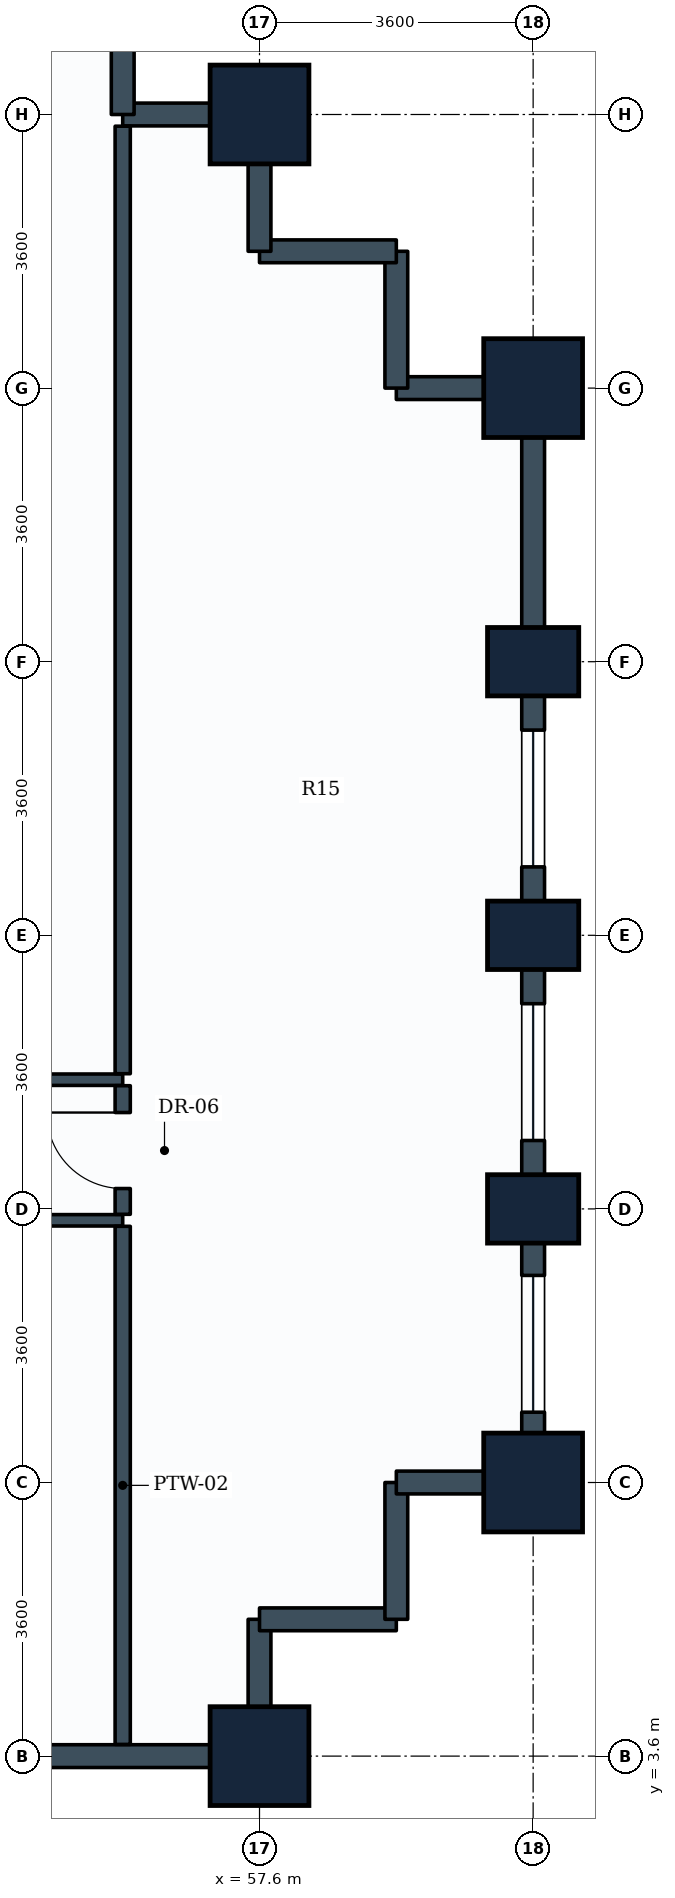
"""IFC4 building model, lengths in metres.
Left out: names, types, materials, properties, quantities, classifications, styles, units other than length and angle.
Written with IfcOpenShell. Run it as: python <this file> out.ifc"""

import sys

from ifc_helpers import new_model, si_unit, direction, frame, frame_2d, origin, origin_2d, place, context, subcontext, project, spatial, rectangle, extrude, element, fill, save


model = new_model("IFC4")
c1 = context("Model", 3, precision=1e-05, world=origin(), true_north=direction((0.0, 1.0)))
c2 = subcontext(c1, "Body", "Model", "MODEL_VIEW")
j1 = project(units=[si_unit("LENGTHUNIT", "METRE"), si_unit("PLANEANGLEUNIT", "RADIAN")], contexts=[c1])
p1 = place(None, origin())
s1 = spatial("IfcSite", under=j1, at=p1, CompositionType="ELEMENT")
p2 = place(p1, origin())
s2 = spatial("IfcBuilding", under=s1, at=p2, CompositionType="ELEMENT")
p3 = place(p2, frame((0.0, 0.0, 70.8)))
s3 = spatial("IfcBuildingStorey", under=s2, at=p3, CompositionType="ELEMENT", Elevation=70.8)
for number, where, z_axis, x_axis in (
    (1, (57.6, 3.6, 0.0), (0.0, 0.0, 1.0), (1.0, 0.0, 0.0)),
    (2, (57.6, 25.2, 0.0), (0.0, 0.0, 1.0), (1.0, 0.0, 0.0)),
    (3, (61.2, 7.2, 0.0), (0.0, 0.0, 1.0), (1.0, 0.0, 0.0)),
):
    element("IfcColumn", number, at=place(p3, frame(where, z_axis=z_axis, x_axis=x_axis)), inside=s3, PredefinedType="COLUMN", context=c2, shape_type="SweptSolid", body=[
        extrude(rectangle(XDim=1.3, YDim=1.3, at=origin_2d()), origin(), (0.0, 0.0, 1.0), 3.9),
    ])
for number, where, z_axis, x_axis in (
    (4, (61.2, 10.8, 0.0), (0.0, 0.0, 1.0), (0.0, 1.0, 0.0)),
    (5, (61.2, 14.4, 0.0), (0.0, 0.0, 1.0), (0.0, 1.0, 0.0)),
    (6, (61.2, 18.0, 0.0), (0.0, 0.0, 1.0), (0.0, 1.0, 0.0)),
):
    element("IfcColumn", number, at=place(p3, frame(where, z_axis=z_axis, x_axis=x_axis)), inside=s3, PredefinedType="COLUMN", context=c2, shape_type="SweptSolid", body=[
        extrude(rectangle(XDim=0.9, YDim=1.2, at=origin_2d()), origin(), (0.0, 0.0, 1.0), 3.9),
    ])
p4 = place(p3, frame((61.2, 21.6, 0.0), z_axis=(0.0, 0.0, 1.0), x_axis=(0.0, 1.0, 0.0)))
e7 = element("IfcColumn", 7, at=p4, inside=s3, PredefinedType="COLUMN", context=c2, shape_type="SweptSolid", body=[
    extrude(rectangle(XDim=1.3, YDim=1.3, at=origin_2d()), origin(), (0.0, 0.0, 1.0), 3.9),
])
p5 = place(p3, frame((57.6, 3.6, 0.0), z_axis=(0.0, 0.0, 1.0), x_axis=(-1.0, 0.0, 0.0)))
e8 = element("IfcWall", 8, at=p5, inside=s3, PredefinedType="STANDARD", context=c2, shape_type="SweptSolid", body=[
    extrude(rectangle(XDim=3.6, YDim=0.3, at=frame_2d((1.8, 0.0))), origin(), (0.0, 0.0, 1.0), 2.93),
])
p6 = place(p3, frame((57.6, 5.4, 0.0), z_axis=(0.0, 0.0, 1.0), x_axis=(0.0, -1.0, 0.0)))
e9 = element("IfcWall", 9, at=p6, inside=s3, PredefinedType="STANDARD", context=c2, shape_type="SweptSolid", body=[
    extrude(rectangle(XDim=1.8, YDim=0.3, at=frame_2d((0.9, 0.0))), origin(), (0.0, 0.0, 1.0), 2.93),
])
p7 = place(p3, frame((59.4, 5.4, 0.0), z_axis=(0.0, 0.0, 1.0), x_axis=(-1.0, 0.0, 0.0)))
e10 = element("IfcWall", 10, at=p7, inside=s3, PredefinedType="STANDARD", context=c2, shape_type="SweptSolid", body=[
    extrude(rectangle(XDim=1.8, YDim=0.3, at=frame_2d((0.9, 0.0))), origin(), (0.0, 0.0, 1.0), 3.565),
])
p8 = place(p3, frame((59.4, 7.2, 0.0), z_axis=(0.0, 0.0, 1.0), x_axis=(0.0, -1.0, 0.0)))
e11 = element("IfcWall", 11, at=p8, inside=s3, PredefinedType="STANDARD", context=c2, shape_type="SweptSolid", body=[
    extrude(rectangle(XDim=1.8, YDim=0.3, at=frame_2d((0.9, 0.0))), origin(), (0.0, 0.0, 1.0), 3.565),
])
p9 = place(p3, frame((61.2, 7.2, 0.0), z_axis=(0.0, 0.0, 1.0), x_axis=(-1.0, 0.0, 0.0)))
e12 = element("IfcWall", 12, at=p9, inside=s3, PredefinedType="STANDARD", context=c2, shape_type="SweptSolid", body=[
    extrude(rectangle(XDim=1.8, YDim=0.3, at=frame_2d((0.9, 0.0))), origin(), (0.0, 0.0, 1.0), 2.93),
])
p10 = place(p3, frame((61.2, 10.8, 0.0), z_axis=(0.0, 0.0, 1.0), x_axis=(0.0, -1.0, 0.0)))
e13 = element("IfcWall", 13, at=p10, inside=s3, PredefinedType="STANDARD", context=c2, shape_type="SweptSolid", body=[
    extrude(rectangle(XDim=3.6, YDim=0.3, at=frame_2d((1.8, 0.0))), origin(), (0.0, 0.0, 1.0), 2.93),
])
p11 = place(p10, frame((0.875, 0.0, 0.85)))
e14 = element("IfcOpeningElement", 14, at=p11, cuts=e13, PredefinedType="OPENING", context=c2, shape_type="SweptSolid", body=[
    extrude(rectangle(XDim=1.8, YDim=1.35, at=frame_2d((0.9, 0.675))), frame((0.0, 0.16, 0.0), z_axis=(0.0, -1.0, 0.0), x_axis=(1.0, 0.0, 0.0)), (0.0, 0.0, 1.0), 0.32),
])
p12 = place(p3, frame((61.2, 14.4, 0.0), z_axis=(0.0, 0.0, 1.0), x_axis=(0.0, -1.0, 0.0)))
e15 = element("IfcWall", 15, at=p12, inside=s3, PredefinedType="STANDARD", context=c2, shape_type="SweptSolid", body=[
    extrude(rectangle(XDim=3.6, YDim=0.3, at=frame_2d((1.8, 0.0))), origin(), (0.0, 0.0, 1.0), 2.93),
])
p13 = place(p12, frame((0.9, 0.0, 0.85)))
e16 = element("IfcOpeningElement", 16, at=p13, cuts=e15, PredefinedType="OPENING", context=c2, shape_type="SweptSolid", body=[
    extrude(rectangle(XDim=1.8, YDim=1.35, at=frame_2d((0.9, 0.675))), frame((0.0, 0.16, 0.0), z_axis=(0.0, -1.0, 0.0), x_axis=(1.0, 0.0, 0.0)), (0.0, 0.0, 1.0), 0.32),
])
p14 = place(p3, frame((61.2, 18.0, 0.0), z_axis=(0.0, 0.0, 1.0), x_axis=(0.0, -1.0, 0.0)))
e17 = element("IfcWall", 17, at=p14, inside=s3, PredefinedType="STANDARD", context=c2, shape_type="SweptSolid", body=[
    extrude(rectangle(XDim=3.6, YDim=0.3, at=frame_2d((1.8, 0.0))), origin(), (0.0, 0.0, 1.0), 2.93),
])
p15 = place(p14, frame((0.9, 0.0, 0.85)))
e18 = element("IfcOpeningElement", 18, at=p15, cuts=e17, PredefinedType="OPENING", context=c2, shape_type="SweptSolid", body=[
    extrude(rectangle(XDim=1.8, YDim=1.35, at=frame_2d((0.9, 0.675))), frame((0.0, 0.16, 0.0), z_axis=(0.0, -1.0, 0.0), x_axis=(1.0, 0.0, 0.0)), (0.0, 0.0, 1.0), 0.32),
])
p16 = place(p3, frame((61.2, 21.6, 0.0), z_axis=(0.0, 0.0, 1.0), x_axis=(0.0, -1.0, 0.0)))
e19 = element("IfcWall", 19, at=p16, inside=s3, PredefinedType="STANDARD", context=c2, shape_type="SweptSolid", body=[
    extrude(rectangle(XDim=3.6, YDim=0.3, at=frame_2d((1.8, 0.0))), origin(), (0.0, 0.0, 1.0), 2.93),
])
p17 = place(p3, frame((61.2, 21.6, 0.0), z_axis=(0.0, 0.0, 1.0), x_axis=(-1.0, 0.0, 0.0)))
e20 = element("IfcWall", 20, at=p17, inside=s3, PredefinedType="STANDARD", context=c2, shape_type="SweptSolid", body=[
    extrude(rectangle(XDim=1.8, YDim=0.3, at=frame_2d((0.9, 0.0))), origin(), (0.0, 0.0, 1.0), 2.93),
])
for number, where, z_axis, x_axis in (
    (21, (59.4, 23.4, 0.0), (0.0, 0.0, 1.0), (0.0, -1.0, 0.0)),
    (22, (57.6, 23.4, 0.0), (0.0, 0.0, 1.0), (1.0, 0.0, 0.0)),
):
    element("IfcWall", number, at=place(p3, frame(where, z_axis=z_axis, x_axis=x_axis)), inside=s3, PredefinedType="STANDARD", context=c2, shape_type="SweptSolid", body=[
        extrude(rectangle(XDim=1.8, YDim=0.3, at=frame_2d((0.9, 0.0))), origin(), (0.0, 0.0, 1.0), 3.565),
    ])
for number, where, z_axis, x_axis in (
    (23, (57.6, 25.2, 0.0), (0.0, 0.0, 1.0), (0.0, -1.0, 0.0)),
    (24, (55.8, 25.2, 0.0), (0.0, 0.0, 1.0), (1.0, 0.0, 0.0)),
):
    element("IfcWall", number, at=place(p3, frame(where, z_axis=z_axis, x_axis=x_axis)), inside=s3, PredefinedType="STANDARD", context=c2, shape_type="SweptSolid", body=[
        extrude(rectangle(XDim=1.8, YDim=0.3, at=frame_2d((0.9, 0.0))), origin(), (0.0, 0.0, 1.0), 2.93),
    ])
p18 = place(p3, frame((55.8, 27.3, 0.0), z_axis=(0.0, 0.0, 1.0), x_axis=(0.0, -1.0, 0.0)))
e25 = element("IfcWall", 25, at=p18, inside=s3, PredefinedType="STANDARD", context=c2, shape_type="SweptSolid", body=[
    extrude(rectangle(XDim=2.1, YDim=0.3, at=frame_2d((1.05, 0.0))), origin(), (0.0, 0.0, 1.0), 2.93),
])
p19 = place(p3, frame((45.609, 10.65, 0.0), z_axis=(0.0, 0.0, 1.0), x_axis=(1.0, 0.0, 0.0)))
e26 = element("IfcWall", 26, at=p19, inside=s3, PredefinedType="PARTITIONING", context=c2, shape_type="SweptSolid", body=[
    extrude(rectangle(XDim=10.191, YDim=0.15, at=frame_2d((5.096, 0.0))), origin(), (0.0, 0.0, 1.0), 2.96),
])
p20 = place(p19, frame((4.516, 0.0, 0.0)))
e27 = element("IfcOpeningElement", 27, at=p20, cuts=e26, PredefinedType="OPENING", context=c2, shape_type="SweptSolid", body=[
    extrude(rectangle(XDim=1.0, YDim=2.1, at=frame_2d((0.5, 1.05))), frame((0.0, 0.085, 0.0), z_axis=(0.0, -1.0, 0.0), x_axis=(1.0, 0.0, 0.0)), (0.0, 0.0, 1.0), 0.17),
])
p21 = place(p3, frame((45.129, 12.5, 0.0), z_axis=(0.0, 0.0, 1.0), x_axis=(1.0, 0.0, 0.0)))
e28 = element("IfcWall", 28, at=p21, inside=s3, PredefinedType="PARTITIONING", context=c2, shape_type="SweptSolid", body=[
    extrude(rectangle(XDim=10.671, YDim=0.15, at=frame_2d((5.335, 0.0))), origin(), (0.0, 0.0, 1.0), 2.97),
])
p22 = place(p21, frame((1.719, 0.0, 0.0)))
e29 = element("IfcOpeningElement", 29, at=p22, cuts=e28, PredefinedType="OPENING", context=c2, shape_type="SweptSolid", body=[
    extrude(rectangle(XDim=1.0, YDim=2.1, at=frame_2d((0.5, 1.05))), frame((0.0, 0.085, 0.0), z_axis=(0.0, -1.0, 0.0), x_axis=(1.0, 0.0, 0.0)), (0.0, 0.0, 1.0), 0.17),
])
p23 = place(p3, frame((55.8, 3.754, 0.0), z_axis=(0.0, 0.0, 1.0), x_axis=(0.0, 1.0, 0.0)))
e30 = element("IfcWall", 30, at=p23, inside=s3, PredefinedType="PARTITIONING", context=c2, shape_type="SweptSolid", body=[
    extrude(rectangle(XDim=6.817, YDim=0.2, at=frame_2d((3.409, 0.0))), origin(), (0.0, 0.0, 1.0), 2.93),
])
p24 = place(p3, frame((55.8, 12.579, 0.0), z_axis=(0.0, 0.0, 1.0), x_axis=(0.0, 1.0, 0.0)))
e31 = element("IfcWall", 31, at=p24, inside=s3, PredefinedType="PARTITIONING", context=c2, shape_type="SweptSolid", body=[
    extrude(rectangle(XDim=12.467, YDim=0.2, at=frame_2d((6.233, 0.0))), origin(), (0.0, 0.0, 1.0), 2.93),
])
p25 = place(p3, frame((55.8, 10.729, 0.0), z_axis=(0.0, 0.0, 1.0), x_axis=(0.0, 1.0, 0.0)))
e32 = element("IfcWall", 32, at=p25, inside=s3, PredefinedType="PARTITIONING", context=c2, shape_type="SweptSolid", body=[
    extrude(rectangle(XDim=1.692, YDim=0.2, at=frame_2d((0.846, 0.0))), origin(), (0.0, 0.0, 1.0), 3.565),
])
p26 = place(p25, frame((0.339, 0.0, 0.0)))
e33 = element("IfcOpeningElement", 33, at=p26, cuts=e32, PredefinedType="OPENING", context=c2, shape_type="SweptSolid", body=[
    extrude(rectangle(XDim=1.0, YDim=2.1, at=frame_2d((0.5, 1.05))), frame((0.0, 0.11, 0.0), z_axis=(0.0, -1.0, 0.0), x_axis=(1.0, 0.0, 0.0)), (0.0, 0.0, 1.0), 0.22),
])
p27 = place(p11, origin())
e34 = element("IfcWindow", 34, at=p27, inside=s3, PartitioningType="SINGLE_PANEL", PredefinedType="WINDOW", context=c2, shape_type="SweptSolid", body=[
    extrude(rectangle(XDim=1.8, YDim=1.35, at=frame_2d((0.9, 0.675))), frame((0.0, 0.03, 0.0), z_axis=(0.0, -1.0, 0.0), x_axis=(1.0, 0.0, 0.0)), (0.0, 0.0, 1.0), 0.06),
])
fill(e14, e34)
p28 = place(p13, origin())
e35 = element("IfcWindow", 35, at=p28, inside=s3, PartitioningType="SINGLE_PANEL", PredefinedType="WINDOW", context=c2, shape_type="SweptSolid", body=[
    extrude(rectangle(XDim=1.8, YDim=1.35, at=frame_2d((0.9, 0.675))), frame((0.0, 0.03, 0.0), z_axis=(0.0, -1.0, 0.0), x_axis=(1.0, 0.0, 0.0)), (0.0, 0.0, 1.0), 0.06),
])
fill(e16, e35)
p29 = place(p15, origin())
e36 = element("IfcWindow", 36, at=p29, inside=s3, PartitioningType="SINGLE_PANEL", PredefinedType="WINDOW", context=c2, shape_type="SweptSolid", body=[
    extrude(rectangle(XDim=1.8, YDim=1.35, at=frame_2d((0.9, 0.675))), frame((0.0, 0.03, 0.0), z_axis=(0.0, -1.0, 0.0), x_axis=(1.0, 0.0, 0.0)), (0.0, 0.0, 1.0), 0.06),
])
fill(e18, e36)
p30 = place(p26, origin())
e37 = element("IfcDoor", 37, at=p30, inside=s3, OperationType="SINGLE_SWING_RIGHT", PredefinedType="DOOR", context=c2, shape_type="SweptSolid", body=[
    extrude(rectangle(XDim=1.0, YDim=2.1, at=frame_2d((0.5, 1.05))), frame((0.0, 0.025, 0.0), z_axis=(0.0, -1.0, 0.0), x_axis=(1.0, 0.0, 0.0)), (0.0, 0.0, 1.0), 0.05),
])
fill(e33, e37)
save(model, sys.argv[1])
